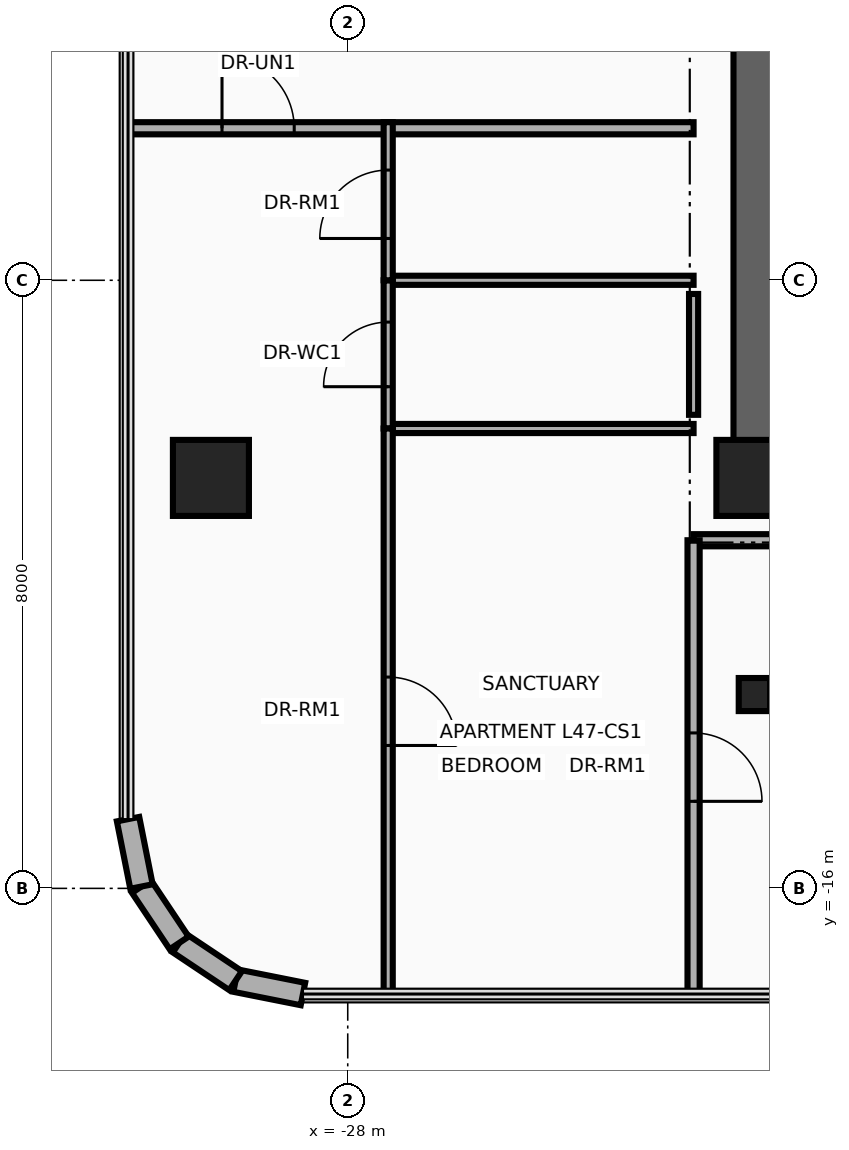
"""IFC4 building model, lengths in metres.
Left out: names, types, materials, properties, quantities, classifications, styles, units other than length and angle.
Written with IfcOpenShell. Run it as: python <this file> out.ifc"""

import sys

from ifc_helpers import new_model, si_unit, direction, frame, frame_2d, origin, origin_2d, place, context, subcontext, project, spatial, rectangle, i_section, extrude, source, transform, mapped, element, fill, save


model = new_model("IFC4")
c1 = context("Model", 3, precision=1e-05, world=origin(), true_north=direction((0.0, 1.0)))
c2 = subcontext(c1, "Body", "Model", "MODEL_VIEW")
j1 = project(units=[si_unit("LENGTHUNIT", "METRE"), si_unit("PLANEANGLEUNIT", "RADIAN")], contexts=[c1])
p1 = place(None, origin())
s1 = spatial("IfcSite", under=j1, at=p1, CompositionType="ELEMENT")
p2 = place(p1, origin())
s2 = spatial("IfcBuilding", under=s1, at=p2, CompositionType="ELEMENT")
p3 = place(p2, frame((0.0, 0.0, 184.45)))
s3 = spatial("IfcBuildingStorey", under=s2, at=p3, CompositionType="ELEMENT", Elevation=184.45)
p4 = place(p3, frame((-22.65, -11.075, 0.0), z_axis=(0.0, 0.0, 1.0), x_axis=(0.0, 1.0, 0.0)))
e1 = element("IfcWall", 1, at=p4, inside=s3, PredefinedType="SHEAR", context=c2, shape_type="SweptSolid", body=[
    extrude(rectangle(XDim=22.15, YDim=0.55, at=frame_2d((11.075, 0.0))), origin(), (0.0, 0.0, 1.0), 3.63),
])
p5 = place(p3, frame((-22.65, -10.8, 0.0), z_axis=(0.0, 0.0, 1.0), x_axis=(1.0, 0.0, 0.0)))
e2 = element("IfcWall", 2, at=p5, inside=s3, PredefinedType="SHEAR", context=c2, shape_type="SweptSolid", body=[
    extrude(rectangle(XDim=10.25, YDim=0.55, at=frame_2d((5.125, 0.0))), origin(), (0.0, 0.0, 1.0), 3.63),
])
m1 = source(origin(), c2, "Body", "SweptSolid", [
    extrude(rectangle(XDim=1.0, YDim=1.0, at=origin_2d()), origin(), (0.0, 0.0, 1.0), 3.95),
])
for number, where, z_axis, x_axis in (
    (3, (-29.8, -10.6, 0.0), (0.0, 0.0, 1.0), (1.0, 0.0, 0.0)),
    (4, (-22.65, -10.6, 0.0), (0.0, 0.0, 1.0), (1.0, 0.0, 0.0)),
):
    element("IfcColumn", number, at=place(p3, frame(where, z_axis=z_axis, x_axis=x_axis)), inside=s3, PredefinedType="COLUMN", context=c2, shape_type="MappedRepresentation", body=[
        mapped(m1, transform((0.0, 0.0, 0.0), x_axis=(1.0, 0.0, 0.0), y_axis=(0.0, 1.0, 0.0), z_axis=(0.0, 0.0, 1.0), scale=1.0)),
    ])
m2 = source(origin(), c2, "Body", "SweptSolid", [
    extrude(i_section(OverallWidth=0.412, OverallDepth=0.435, WebThickness=0.036, FlangeThickness=0.057, at=origin_2d()), origin(), (0.0, 0.0, 1.0), 3.95),
])
p6 = place(p3, frame((-22.65, -13.45, 0.0), z_axis=(0.0, 0.0, 1.0), x_axis=(1.0, 0.0, 0.0)))
e5 = element("IfcColumn", 5, at=p6, inside=s3, PredefinedType="COLUMN", context=c2, shape_type="MappedRepresentation", body=[
    mapped(m2, transform((0.0, 0.0, 0.0), x_axis=(1.0, 0.0, 0.0), y_axis=(0.0, 1.0, 0.0), z_axis=(0.0, 0.0, 1.0), scale=1.0)),
])
p7 = place(p3, frame((-28.589, -17.39, 0.0), z_axis=(0.0, 0.0, 1.0), x_axis=(-0.980798241101, 0.195025152871, 0.0)))
e6 = element("IfcWall", 6, at=p7, inside=s3, PredefinedType="SOLIDWALL", context=c2, shape_type="SweptSolid", body=[
    extrude(rectangle(XDim=0.904, YDim=0.3, at=frame_2d((0.452, 0.0))), origin(), (0.0, 0.0, 1.0), 3.63),
])
for number, where, z_axis, x_axis in (
    (7, (-29.476, -17.214, 0.0), (0.0, 0.0, 1.0), (-0.832, 0.556, 0.0)),
    (8, (-30.218, -16.718, 0.0), (0.0, 0.0, 1.0), (-0.556, 0.832, 0.0)),
):
    element("IfcWall", number, at=place(p3, frame(where, z_axis=z_axis, x_axis=x_axis)), inside=s3, PredefinedType="SOLIDWALL", context=c2, shape_type="SweptSolid", body=[
        extrude(rectangle(XDim=0.893, YDim=0.3, at=frame_2d((0.446, 0.0))), origin(), (0.0, 0.0, 1.0), 3.63),
    ])
p8 = place(p3, frame((-30.714, -15.976, 0.0), z_axis=(0.0, 0.0, 1.0), x_axis=(-0.195025152871, 0.980798241101, 0.0)))
e9 = element("IfcWall", 9, at=p8, inside=s3, PredefinedType="SOLIDWALL", context=c2, shape_type="SweptSolid", body=[
    extrude(rectangle(XDim=0.904, YDim=0.3, at=frame_2d((0.452, 0.0))), origin(), (0.0, 0.0, 1.0), 3.63),
])
p9 = place(p3, frame((-23.45, -11.42, 0.0), z_axis=(0.0, 0.0, 1.0), x_axis=(1.0, 0.0, 0.0)))
e10 = element("IfcWall", 10, at=p9, inside=s3, PredefinedType="PARTITIONING", context=c2, shape_type="SweptSolid", body=[
    extrude(rectangle(XDim=13.84, YDim=0.16, at=frame_2d((6.92, 0.0))), origin(), (0.0, 0.0, 1.0), 3.004),
])
p10 = place(p3, frame((-23.45, -17.39, 0.0), z_axis=(0.0, 0.0, 1.0), x_axis=(0.0, 1.0, 0.0)))
e11 = element("IfcWall", 11, at=p10, inside=s3, PredefinedType="PARTITIONING", context=c2, shape_type="SweptSolid", body=[
    extrude(rectangle(XDim=5.97, YDim=0.16, at=frame_2d((2.985, 0.0))), origin(), (0.0, 0.0, 1.0), 3.63),
])
p11 = place(p10, frame((2.535, 0.0, 0.0)))
e12 = element("IfcOpeningElement", 12, at=p11, cuts=e11, PredefinedType="OPENING", context=c2, shape_type="SweptSolid", body=[
    extrude(rectangle(XDim=0.9, YDim=2.1, at=frame_2d((0.45, 1.05))), frame((0.0, 0.095, 0.0), z_axis=(0.0, -1.0, 0.0), x_axis=(1.0, 0.0, 0.0)), (0.0, 0.0, 1.0), 0.19),
])
p12 = place(p3, frame((-30.89, -6.0, 0.0), z_axis=(0.0, 0.0, 1.0), x_axis=(1.0, 0.0, 0.0)))
e13 = element("IfcWall", 13, at=p12, inside=s3, PredefinedType="PARTITIONING", context=c2, shape_type="SweptSolid", body=[
    extrude(rectangle(XDim=7.44, YDim=0.16, at=frame_2d((3.72, 0.0))), origin(), (0.0, 0.0, 1.0), 3.076),
])
p13 = place(p12, frame((1.236, 0.0, 0.0)))
e14 = element("IfcOpeningElement", 14, at=p13, cuts=e13, PredefinedType="OPENING", context=c2, shape_type="SweptSolid", body=[
    extrude(rectangle(XDim=0.95, YDim=2.15, at=frame_2d((0.475, 1.075))), frame((0.0, 0.095, 0.0), z_axis=(0.0, -1.0, 0.0), x_axis=(1.0, 0.0, 0.0)), (0.0, 0.0, 1.0), 0.19),
])
for number, where, z_axis, x_axis in (
    (15, (-27.468, -8.0, 0.0), (0.0, 0.0, 1.0), (1.0, 0.0, 0.0)),
    (16, (-27.468, -9.95, 0.0), (0.0, 0.0, 1.0), (1.0, 0.0, 0.0)),
):
    element("IfcWall", number, at=place(p3, frame(where, z_axis=z_axis, x_axis=x_axis)), inside=s3, PredefinedType="PARTITIONING", context=c2, shape_type="SweptSolid", body=[
        extrude(rectangle(XDim=4.018, YDim=0.12, at=frame_2d((2.009, 0.0))), origin(), (0.0, 0.0, 1.0), 3.63),
    ])
p14 = place(p3, frame((-27.468, -9.95, 0.0), z_axis=(0.0, 0.0, 1.0), x_axis=(0.0, 1.0, 0.0)))
e17 = element("IfcWall", 17, at=p14, inside=s3, PredefinedType="PARTITIONING", context=c2, shape_type="SweptSolid", body=[
    extrude(rectangle(XDim=1.95, YDim=0.12, at=frame_2d((0.975, 0.0))), origin(), (0.0, 0.0, 1.0), 3.158),
])
p15 = place(p14, frame((0.55, 0.0, 0.0)))
e18 = element("IfcOpeningElement", 18, at=p15, cuts=e17, PredefinedType="OPENING", context=c2, shape_type="SweptSolid", body=[
    extrude(rectangle(XDim=0.85, YDim=2.1, at=frame_2d((0.425, 1.05))), frame((0.0, 0.075, 0.0), z_axis=(0.0, -1.0, 0.0), x_axis=(1.0, 0.0, 0.0)), (0.0, 0.0, 1.0), 0.15),
])
p16 = place(p3, frame((-27.468, -8.0, 0.0), z_axis=(0.0, 0.0, 1.0), x_axis=(0.0, 1.0, 0.0)))
e19 = element("IfcWall", 19, at=p16, inside=s3, PredefinedType="PARTITIONING", context=c2, shape_type="SweptSolid", body=[
    extrude(rectangle(XDim=2.08, YDim=0.12, at=frame_2d((1.04, 0.0))), origin(), (0.0, 0.0, 1.0), 3.158),
])
p17 = place(p16, frame((0.55, 0.0, 0.0)))
e20 = element("IfcOpeningElement", 20, at=p17, cuts=e19, PredefinedType="OPENING", context=c2, shape_type="SweptSolid", body=[
    extrude(rectangle(XDim=0.9, YDim=2.1, at=frame_2d((0.45, 1.05))), frame((0.0, 0.075, 0.0), z_axis=(0.0, -1.0, 0.0), x_axis=(1.0, 0.0, 0.0)), (0.0, 0.0, 1.0), 0.15),
])
p18 = place(p3, frame((-27.468, -17.39, 0.0), z_axis=(0.0, 0.0, 1.0), x_axis=(0.0, 1.0, 0.0)))
e21 = element("IfcWall", 21, at=p18, inside=s3, PredefinedType="PARTITIONING", context=c2, shape_type="SweptSolid", body=[
    extrude(rectangle(XDim=7.44, YDim=0.12, at=frame_2d((3.72, 0.0))), origin(), (0.0, 0.0, 1.0), 2.665),
])
p19 = place(p18, frame((3.27, 0.0, 0.0)))
e22 = element("IfcOpeningElement", 22, at=p19, cuts=e21, PredefinedType="OPENING", context=c2, shape_type="SweptSolid", body=[
    extrude(rectangle(XDim=0.9, YDim=2.1, at=frame_2d((0.45, 1.05))), frame((0.0, 0.075, 0.0), z_axis=(0.0, -1.0, 0.0), x_axis=(1.0, 0.0, 0.0)), (0.0, 0.0, 1.0), 0.15),
])
p20 = place(p3, frame((-23.45, -9.77, 0.0), z_axis=(0.0, 0.0, 1.0), x_axis=(0.0, 1.0, 0.0)))
e23 = element("IfcWall", 23, at=p20, inside=s3, PredefinedType="PARTITIONING", context=c2, shape_type="SweptSolid", body=[
    extrude(rectangle(XDim=1.59, YDim=0.12, at=frame_2d((0.795, 0.0))), origin(), (0.0, 0.0, 1.0), 3.158),
])
p21 = place(p13, origin())
e24 = element("IfcDoor", 24, at=p21, inside=s3, OperationType="SINGLE_SWING_RIGHT", PredefinedType="DOOR", context=c2, shape_type="SweptSolid", body=[
    extrude(rectangle(XDim=0.95, YDim=2.15, at=frame_2d((0.475, 1.075))), frame((0.0, 0.025, 0.0), z_axis=(0.0, -1.0, 0.0), x_axis=(1.0, 0.0, 0.0)), (0.0, 0.0, 1.0), 0.05),
])
fill(e14, e24)
p22 = place(p15, origin())
e25 = element("IfcDoor", 25, at=p22, inside=s3, OperationType="SINGLE_SWING_LEFT", PredefinedType="DOOR", context=c2, shape_type="SweptSolid", body=[
    extrude(rectangle(XDim=0.85, YDim=2.1, at=frame_2d((0.425, 1.05))), frame((0.0, 0.025, 0.0), z_axis=(0.0, -1.0, 0.0), x_axis=(1.0, 0.0, 0.0)), (0.0, 0.0, 1.0), 0.05),
])
fill(e18, e25)
p23 = place(p17, origin())
e26 = element("IfcDoor", 26, at=p23, inside=s3, OperationType="SINGLE_SWING_RIGHT", PredefinedType="DOOR", context=c2, shape_type="SweptSolid", body=[
    extrude(rectangle(XDim=0.9, YDim=2.1, at=frame_2d((0.45, 1.05))), frame((0.0, 0.025, 0.0), z_axis=(0.0, -1.0, 0.0), x_axis=(1.0, 0.0, 0.0)), (0.0, 0.0, 1.0), 0.05),
])
fill(e20, e26)
p24 = place(p19, frame((0.9, 0.0, 0.0), z_axis=(0.0, 0.0, 1.0), x_axis=(-1.0, 0.0, 0.0)))
e27 = element("IfcDoor", 27, at=p24, inside=s3, OperationType="SINGLE_SWING_LEFT", PredefinedType="DOOR", context=c2, shape_type="SweptSolid", body=[
    extrude(rectangle(XDim=0.9, YDim=2.1, at=frame_2d((0.45, 1.05))), frame((0.0, 0.025, 0.0), z_axis=(0.0, -1.0, 0.0), x_axis=(1.0, 0.0, 0.0)), (0.0, 0.0, 1.0), 0.05),
])
fill(e22, e27)
p25 = place(p11, frame((0.9, 0.0, 0.0), z_axis=(0.0, 0.0, 1.0), x_axis=(-1.0, 0.0, 0.0)))
e28 = element("IfcDoor", 28, at=p25, inside=s3, OperationType="SINGLE_SWING_LEFT", PredefinedType="DOOR", context=c2, shape_type="SweptSolid", body=[
    extrude(rectangle(XDim=0.9, YDim=2.1, at=frame_2d((0.45, 1.05))), frame((0.0, 0.025, 0.0), z_axis=(0.0, -1.0, 0.0), x_axis=(1.0, 0.0, 0.0)), (0.0, 0.0, 1.0), 0.05),
])
fill(e12, e28)
save(model, sys.argv[1])
